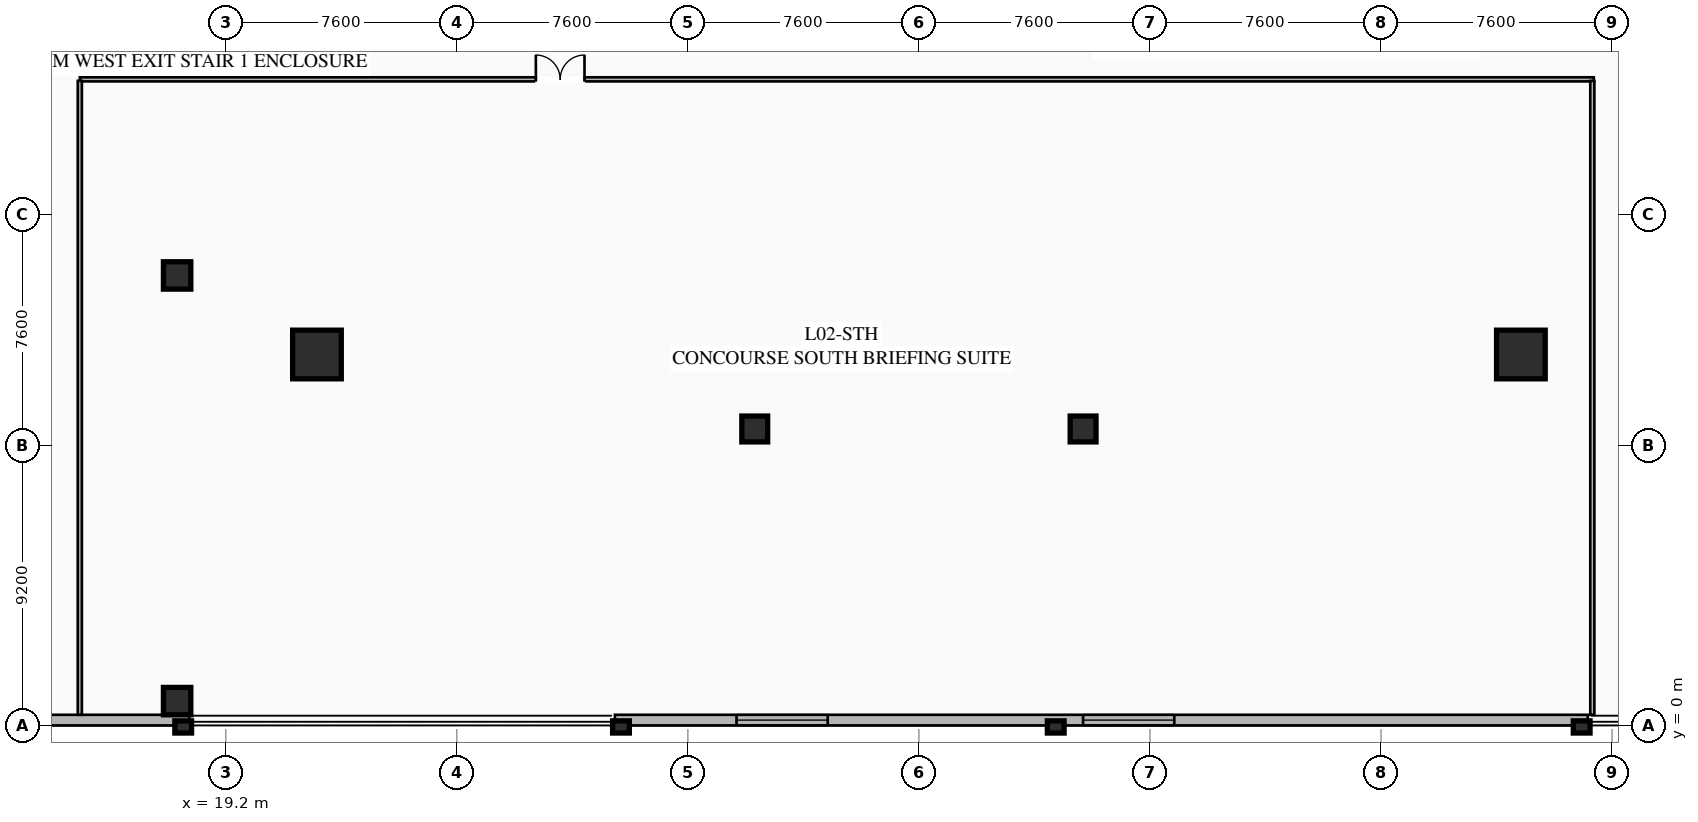
"""IFC4 building model, lengths in metres.
Left out: names, types, materials, properties, quantities, classifications, styles, units other than length and angle.
Written with IfcOpenShell. Run it as: python <this file> out.ifc"""

import sys

from ifc_helpers import new_model, si_unit, direction, frame, frame_2d, origin, origin_2d, place, context, subcontext, project, spatial, rectangle, hollow_rectangle, extrude, element, fill, save


model = new_model("IFC4")
c1 = context("Model", 3, precision=1e-05, world=origin(), true_north=direction((0.0, 1.0)))
c2 = subcontext(c1, "Body", "Model", "MODEL_VIEW")
j1 = project(units=[si_unit("LENGTHUNIT", "METRE"), si_unit("PLANEANGLEUNIT", "RADIAN")], contexts=[c1])
p1 = place(None, origin())
s1 = spatial("IfcSite", under=j1, at=p1, CompositionType="ELEMENT")
p2 = place(p1, origin())
s2 = spatial("IfcBuilding", under=s1, at=p2, CompositionType="ELEMENT")
p3 = place(p2, frame((0.0, 0.0, 10.2)))
s3 = spatial("IfcBuildingStorey", under=s2, at=p3, CompositionType="ELEMENT", Elevation=10.2)
for number, where, z_axis, x_axis in (
    (1, (22.2, 12.2, 0.0), (0.0, 0.0, 1.0), (1.0, 0.0, 0.0)),
    (2, (61.8, 12.2, 0.0), (0.0, 0.0, 1.0), (1.0, 0.0, 0.0)),
):
    element("IfcColumn", number, at=place(p3, frame(where, z_axis=z_axis, x_axis=x_axis)), inside=s3, PredefinedType="COLUMN", context=c2, shape_type="SweptSolid", body=[
        extrude(hollow_rectangle(XDim=1.6, YDim=1.6, WallThickness=0.06, at=origin_2d()), origin(), (0.0, 0.0, 1.0), 5.14),
    ])
for number, where, z_axis, x_axis in (
    (3, (36.6, 9.75, 0.0), (0.0, 0.0, 1.0), (1.0, 0.0, 0.0)),
    (4, (47.4, 9.75, 0.0), (0.0, 0.0, 1.0), (1.0, 0.0, 0.0)),
):
    element("IfcColumn", number, at=place(p3, frame(where, z_axis=z_axis, x_axis=x_axis)), inside=s3, PredefinedType="COLUMN", context=c2, shape_type="SweptSolid", body=[
        extrude(hollow_rectangle(XDim=0.85, YDim=0.85, WallThickness=0.035, at=origin_2d()), origin(), (0.0, 0.0, 1.0), 5.14),
    ])
for number, where, z_axis, x_axis in (
    (5, (17.6, 0.8, 0.0), (0.0, 0.0, 1.0), (1.0, 0.0, 0.0)),
    (6, (17.6, 14.8, 0.0), (0.0, 0.0, 1.0), (1.0, 0.0, 0.0)),
):
    element("IfcColumn", number, at=place(p3, frame(where, z_axis=z_axis, x_axis=x_axis)), inside=s3, PredefinedType="COLUMN", context=c2, shape_type="SweptSolid", body=[
        extrude(rectangle(XDim=0.9, YDim=0.9, at=origin_2d()), origin(), (0.0, 0.0, 1.0), 5.14),
    ])
p4 = place(p3, frame((64.0, 0.175, 0.0), z_axis=(0.0, 0.0, 1.0), x_axis=(-1.0, 0.0, 0.0)))
e7 = element("IfcWall", 7, at=p4, inside=s3, PredefinedType="SOLIDWALL", context=c2, shape_type="SweptSolid", body=[
    extrude(rectangle(XDim=32.0, YDim=0.35, at=frame_2d((16.0, 0.0))), origin(), (0.0, 0.0, 1.0), 5.14),
])
p5 = place(p4, frame((25.0, 0.0, 0.95)))
e8 = element("IfcOpeningElement", 8, at=p5, cuts=e7, PredefinedType="OPENING", context=c2, shape_type="SweptSolid", body=[
    extrude(rectangle(XDim=3.0, YDim=2.4, at=frame_2d((1.5, 1.2))), frame((0.0, 0.185, 0.0), z_axis=(0.0, -1.0, 0.0), x_axis=(1.0, 0.0, 0.0)), (0.0, 0.0, 1.0), 0.37),
])
p6 = place(p4, frame((13.6, 0.0, 0.95)))
e9 = element("IfcOpeningElement", 9, at=p6, cuts=e7, PredefinedType="OPENING", context=c2, shape_type="SweptSolid", body=[
    extrude(rectangle(XDim=3.0, YDim=2.4, at=frame_2d((1.5, 1.2))), frame((0.0, 0.185, 0.0), z_axis=(0.0, -1.0, 0.0), x_axis=(1.0, 0.0, 0.0)), (0.0, 0.0, 1.0), 0.37),
])
p7 = place(p3, frame((18.0, 0.175, 0.0), z_axis=(0.0, 0.0, 1.0), x_axis=(-1.0, 0.0, 0.0)))
e10 = element("IfcWall", 10, at=p7, inside=s3, PredefinedType="SOLIDWALL", context=c2, shape_type="SweptSolid", body=[
    extrude(rectangle(XDim=18.0, YDim=0.35, at=frame_2d((9.0, 0.0))), origin(), (0.0, 0.0, 1.0), 5.14),
])
p8 = place(p7, frame((10.8, 0.0, 0.95)))
e11 = element("IfcOpeningElement", 11, at=p8, cuts=e10, PredefinedType="OPENING", context=c2, shape_type="SweptSolid", body=[
    extrude(rectangle(XDim=3.0, YDim=2.4, at=frame_2d((1.5, 1.2))), frame((0.0, 0.185, 0.0), z_axis=(0.0, -1.0, 0.0), x_axis=(1.0, 0.0, 0.0)), (0.0, 0.0, 1.0), 0.37),
])
p9 = place(p7, frame((5.2, 0.0, 0.95)))
e12 = element("IfcOpeningElement", 12, at=p9, cuts=e10, PredefinedType="OPENING", context=c2, shape_type="SweptSolid", body=[
    extrude(rectangle(XDim=3.0, YDim=2.4, at=frame_2d((1.5, 1.2))), frame((0.0, 0.185, 0.0), z_axis=(0.0, -1.0, 0.0), x_axis=(1.0, 0.0, 0.0)), (0.0, 0.0, 1.0), 0.37),
])
for number, where, z_axis, x_axis in (
    (13, (17.8, -0.05, 0.0), (0.0, 0.0, 1.0), (1.0, 0.0, 0.0)),
    (14, (32.2, -0.05, 0.0), (0.0, 0.0, 1.0), (1.0, 0.0, 0.0)),
    (15, (46.5, -0.05, 0.0), (0.0, 0.0, 1.0), (1.0, 0.0, 0.0)),
    (16, (63.8, -0.05, 0.0), (0.0, 0.0, 1.0), (1.0, 0.0, 0.0)),
):
    element("IfcColumn", number, at=place(p3, frame(where, z_axis=z_axis, x_axis=x_axis)), inside=s3, PredefinedType="PILASTER", context=c2, shape_type="SweptSolid", body=[
        extrude(rectangle(XDim=0.55, YDim=0.4, at=origin_2d()), origin(), (0.0, 0.0, 1.0), 5.14),
    ])
p10 = place(p3, frame((14.4, 21.25, 0.0), z_axis=(0.0, 0.0, 1.0), x_axis=(1.0, 0.0, 0.0)))
e17 = element("IfcWall", 17, at=p10, inside=s3, PredefinedType="PARTITIONING", context=c2, shape_type="SweptSolid", body=[
    extrude(rectangle(XDim=49.8, YDim=0.135, at=frame_2d((24.9, 0.0))), origin(), (0.0, 0.0, 1.0), 2.71),
])
p11 = place(p10, frame((15.0, 0.0, 0.0)))
e18 = element("IfcOpeningElement", 18, at=p11, cuts=e17, PredefinedType="OPENING", context=c2, shape_type="SweptSolid", body=[
    extrude(rectangle(XDim=1.6, YDim=2.25, at=frame_2d((0.8, 1.125))), frame((0.0, 0.077, 0.0), z_axis=(0.0, -1.0, 0.0), x_axis=(1.0, 0.0, 0.0)), (0.0, 0.0, 1.0), 0.155),
])
for number, where, z_axis, x_axis in (
    (19, (14.4, 0.35, 0.0), (0.0, 0.0, 1.0), (0.0, 1.0, 0.0)),
    (20, (64.15, 0.35, 0.0), (0.0, 0.0, 1.0), (0.0, 1.0, 0.0)),
):
    element("IfcWall", number, at=place(p3, frame(where, z_axis=z_axis, x_axis=x_axis)), inside=s3, PredefinedType="PARTITIONING", context=c2, shape_type="SweptSolid", body=[
        extrude(rectangle(XDim=20.85, YDim=0.135, at=frame_2d((10.425, 0.0))), origin(), (0.0, 0.0, 1.0), 2.71),
    ])
p12 = place(p5, origin())
e21 = element("IfcWindow", 21, at=p12, inside=s3, PartitioningType="SINGLE_PANEL", PredefinedType="WINDOW", context=c2, shape_type="SweptSolid", body=[
    extrude(rectangle(XDim=3.0, YDim=2.4, at=frame_2d((1.5, 1.2))), frame((0.0, 0.03, 0.0), z_axis=(0.0, -1.0, 0.0), x_axis=(1.0, 0.0, 0.0)), (0.0, 0.0, 1.0), 0.06),
])
fill(e8, e21)
p13 = place(p6, origin())
e22 = element("IfcWindow", 22, at=p13, inside=s3, PartitioningType="SINGLE_PANEL", PredefinedType="WINDOW", context=c2, shape_type="SweptSolid", body=[
    extrude(rectangle(XDim=3.0, YDim=2.4, at=frame_2d((1.5, 1.2))), frame((0.0, 0.03, 0.0), z_axis=(0.0, -1.0, 0.0), x_axis=(1.0, 0.0, 0.0)), (0.0, 0.0, 1.0), 0.06),
])
fill(e9, e22)
p14 = place(p11, origin())
e23 = element("IfcDoor", 23, at=p14, inside=s3, OperationType="DOUBLE_DOOR_SINGLE_SWING", PredefinedType="DOOR", context=c2, shape_type="SweptSolid", body=[
    extrude(rectangle(XDim=1.6, YDim=2.25, at=frame_2d((0.8, 1.125))), frame((0.0, 0.025, 0.0), z_axis=(0.0, -1.0, 0.0), x_axis=(1.0, 0.0, 0.0)), (0.0, 0.0, 1.0), 0.05),
])
fill(e18, e23)
save(model, sys.argv[1])
